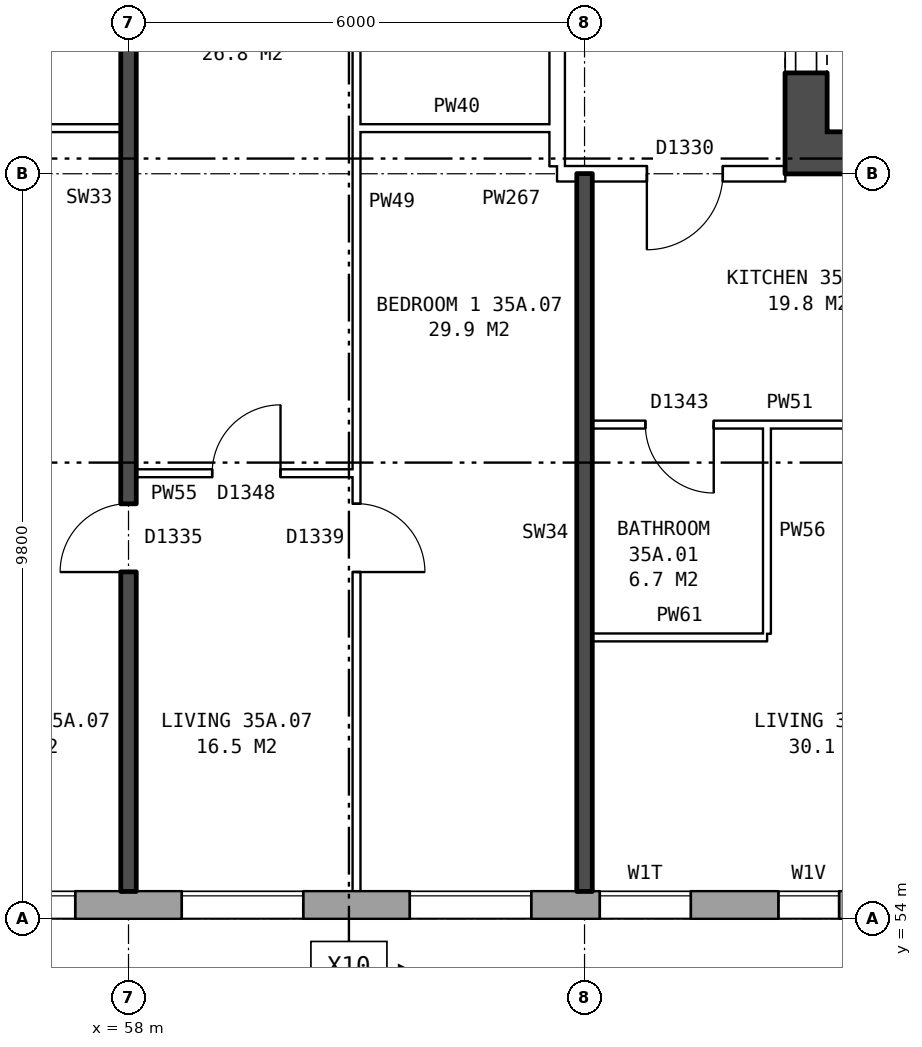
"""IFC4 building model, lengths in metres.
Left out: names, types, materials, properties, quantities, classifications, styles, units other than length and angle.
Written with IfcOpenShell. Run it as: python <this file> out.ifc"""

import sys

from ifc_helpers import new_model, si_unit, direction, frame, frame_2d, origin, place, context, subcontext, project, spatial, rectangle, extrude, element, fill, save


model = new_model("IFC4")
c1 = context("Model", 3, precision=1e-05, world=origin(), true_north=direction((0.0, 1.0)))
c2 = subcontext(c1, "Body", "Model", "MODEL_VIEW")
j1 = project(units=[si_unit("LENGTHUNIT", "METRE"), si_unit("PLANEANGLEUNIT", "RADIAN")], contexts=[c1])
p1 = place(None, origin())
s1 = spatial("IfcSite", under=j1, at=p1, CompositionType="ELEMENT")
p2 = place(p1, origin())
s2 = spatial("IfcBuilding", under=s1, at=p2, CompositionType="ELEMENT")
p3 = place(p2, frame((0.0, 0.0, 126.8)))
s3 = spatial("IfcBuildingStorey", under=s2, at=p3, CompositionType="ELEMENT", Elevation=126.8)
p4 = place(p3, frame((29.825, 54.18, 0.0), z_axis=(0.0, 0.0, 1.0), x_axis=(1.0, 0.0, 0.0)))
e1 = element("IfcWall", 1, at=p4, inside=s3, PredefinedType="STANDARD", context=c2, shape_type="SweptSolid", body=[
    extrude(rectangle(XDim=43.101, YDim=0.36, at=frame_2d((21.55, 0.0))), origin(), (0.0, 0.0, 1.0), 2.85),
])
p5 = place(p4, frame((1.875, 0.0, 0.8)))
e2 = element("IfcOpeningElement", 2, at=p5, cuts=e1, PredefinedType="OPENING", context=c2, shape_type="SweptSolid", body=[
    extrude(rectangle(XDim=1.6, YDim=1.8, at=frame_2d((0.8, 0.9))), frame((0.0, 0.19, 0.0), z_axis=(0.0, -1.0, 0.0), x_axis=(1.0, 0.0, 0.0)), (0.0, 0.0, 1.0), 0.38),
])
p6 = place(p4, frame((4.375, 0.0, 0.8)))
e3 = element("IfcOpeningElement", 3, at=p6, cuts=e1, PredefinedType="OPENING", context=c2, shape_type="SweptSolid", body=[
    extrude(rectangle(XDim=1.0, YDim=1.8, at=frame_2d((0.5, 0.9))), frame((0.0, 0.19, 0.0), z_axis=(0.0, -1.0, 0.0), x_axis=(1.0, 0.0, 0.0)), (0.0, 0.0, 1.0), 0.38),
])
p7 = place(p4, frame((5.675, 0.0, 1.6)))
e4 = element("IfcOpeningElement", 4, at=p7, cuts=e1, PredefinedType="OPENING", context=c2, shape_type="SweptSolid", body=[
    extrude(rectangle(XDim=0.6, YDim=0.9, at=frame_2d((0.3, 0.45))), frame((0.0, 0.19, 0.0), z_axis=(0.0, -1.0, 0.0), x_axis=(1.0, 0.0, 0.0)), (0.0, 0.0, 1.0), 0.38),
])
p8 = place(p4, frame((10.875, 0.0, 0.8)))
e5 = element("IfcOpeningElement", 5, at=p8, cuts=e1, PredefinedType="OPENING", context=c2, shape_type="SweptSolid", body=[
    extrude(rectangle(XDim=1.6, YDim=1.8, at=frame_2d((0.8, 0.9))), frame((0.0, 0.19, 0.0), z_axis=(0.0, -1.0, 0.0), x_axis=(1.0, 0.0, 0.0)), (0.0, 0.0, 1.0), 0.38),
])
p9 = place(p4, frame((13.875, 0.0, 0.8)))
e6 = element("IfcOpeningElement", 6, at=p9, cuts=e1, PredefinedType="OPENING", context=c2, shape_type="SweptSolid", body=[
    extrude(rectangle(XDim=1.6, YDim=1.8, at=frame_2d((0.8, 0.9))), frame((0.0, 0.19, 0.0), z_axis=(0.0, -1.0, 0.0), x_axis=(1.0, 0.0, 0.0)), (0.0, 0.0, 1.0), 0.38),
])
p10 = place(p4, frame((16.875, 0.0, 0.8)))
e7 = element("IfcOpeningElement", 7, at=p10, cuts=e1, PredefinedType="OPENING", context=c2, shape_type="SweptSolid", body=[
    extrude(rectangle(XDim=1.6, YDim=1.8, at=frame_2d((0.8, 0.9))), frame((0.0, 0.19, 0.0), z_axis=(0.0, -1.0, 0.0), x_axis=(1.0, 0.0, 0.0)), (0.0, 0.0, 1.0), 0.38),
])
p11 = place(p4, frame((19.875, 0.0, 0.8)))
e8 = element("IfcOpeningElement", 8, at=p11, cuts=e1, PredefinedType="OPENING", context=c2, shape_type="SweptSolid", body=[
    extrude(rectangle(XDim=1.6, YDim=1.8, at=frame_2d((0.8, 0.9))), frame((0.0, 0.19, 0.0), z_axis=(0.0, -1.0, 0.0), x_axis=(1.0, 0.0, 0.0)), (0.0, 0.0, 1.0), 0.38),
])
p12 = place(p4, frame((22.875, 0.0, 0.8)))
e9 = element("IfcOpeningElement", 9, at=p12, cuts=e1, PredefinedType="OPENING", context=c2, shape_type="SweptSolid", body=[
    extrude(rectangle(XDim=1.6, YDim=1.8, at=frame_2d((0.8, 0.9))), frame((0.0, 0.19, 0.0), z_axis=(0.0, -1.0, 0.0), x_axis=(1.0, 0.0, 0.0)), (0.0, 0.0, 1.0), 0.38),
])
p13 = place(p4, frame((25.875, 0.0, 0.8)))
e10 = element("IfcOpeningElement", 10, at=p13, cuts=e1, PredefinedType="OPENING", context=c2, shape_type="SweptSolid", body=[
    extrude(rectangle(XDim=1.6, YDim=1.8, at=frame_2d((0.8, 0.9))), frame((0.0, 0.19, 0.0), z_axis=(0.0, -1.0, 0.0), x_axis=(1.0, 0.0, 0.0)), (0.0, 0.0, 1.0), 0.38),
])
p14 = place(p4, frame((28.875, 0.0, 0.8)))
e11 = element("IfcOpeningElement", 11, at=p14, cuts=e1, PredefinedType="OPENING", context=c2, shape_type="SweptSolid", body=[
    extrude(rectangle(XDim=1.6, YDim=1.8, at=frame_2d((0.8, 0.9))), frame((0.0, 0.19, 0.0), z_axis=(0.0, -1.0, 0.0), x_axis=(1.0, 0.0, 0.0)), (0.0, 0.0, 1.0), 0.38),
])
p15 = place(p4, frame((31.875, 0.0, 0.8)))
e12 = element("IfcOpeningElement", 12, at=p15, cuts=e1, PredefinedType="OPENING", context=c2, shape_type="SweptSolid", body=[
    extrude(rectangle(XDim=1.6, YDim=1.8, at=frame_2d((0.8, 0.9))), frame((0.0, 0.19, 0.0), z_axis=(0.0, -1.0, 0.0), x_axis=(1.0, 0.0, 0.0)), (0.0, 0.0, 1.0), 0.38),
])
p16 = place(p4, frame((34.375, 0.0, 0.8)))
e13 = element("IfcOpeningElement", 13, at=p16, cuts=e1, PredefinedType="OPENING", context=c2, shape_type="SweptSolid", body=[
    extrude(rectangle(XDim=1.2, YDim=0.9, at=frame_2d((0.6, 0.45))), frame((0.0, 0.19, 0.0), z_axis=(0.0, -1.0, 0.0), x_axis=(1.0, 0.0, 0.0)), (0.0, 0.0, 1.0), 0.38),
])
p17 = place(p4, frame((37.875, 0.0, 0.8)))
e14 = element("IfcOpeningElement", 14, at=p17, cuts=e1, PredefinedType="OPENING", context=c2, shape_type="SweptSolid", body=[
    extrude(rectangle(XDim=1.6, YDim=1.8, at=frame_2d((0.8, 0.9))), frame((0.0, 0.19, 0.0), z_axis=(0.0, -1.0, 0.0), x_axis=(1.0, 0.0, 0.0)), (0.0, 0.0, 1.0), 0.38),
])
p18 = place(p4, frame((40.875, 0.0, 0.8)))
e15 = element("IfcOpeningElement", 15, at=p18, cuts=e1, PredefinedType="OPENING", context=c2, shape_type="SweptSolid", body=[
    extrude(rectangle(XDim=1.6, YDim=1.8, at=frame_2d((0.8, 0.9))), frame((0.0, 0.19, 0.0), z_axis=(0.0, -1.0, 0.0), x_axis=(1.0, 0.0, 0.0)), (0.0, 0.0, 1.0), 0.38),
])
p19 = place(p4, frame((7.525, 0.0, 0.8)))
e16 = element("IfcOpeningElement", 16, at=p19, cuts=e1, PredefinedType="OPENING", context=c2, shape_type="SweptSolid", body=[
    extrude(rectangle(XDim=0.6, YDim=0.9, at=frame_2d((0.3, 0.45))), frame((0.0, 0.19, 0.0), z_axis=(0.0, -1.0, 0.0), x_axis=(1.0, 0.0, 0.0)), (0.0, 0.0, 1.0), 0.38),
])
p20 = place(p4, frame((8.525, 0.0, 0.8)))
e17 = element("IfcOpeningElement", 17, at=p20, cuts=e1, PredefinedType="OPENING", context=c2, shape_type="SweptSolid", body=[
    extrude(rectangle(XDim=1.4, YDim=1.8, at=frame_2d((0.7, 0.9))), frame((0.0, 0.19, 0.0), z_axis=(0.0, -1.0, 0.0), x_axis=(1.0, 0.0, 0.0)), (0.0, 0.0, 1.0), 0.38),
])
p21 = place(p4, frame((36.725, 0.0, 1.7)))
e18 = element("IfcOpeningElement", 18, at=p21, cuts=e1, PredefinedType="OPENING", context=c2, shape_type="SweptSolid", body=[
    extrude(rectangle(XDim=0.8, YDim=0.9, at=frame_2d((0.4, 0.45))), frame((0.0, 0.19, 0.0), z_axis=(0.0, -1.0, 0.0), x_axis=(1.0, 0.0, 0.0)), (0.0, 0.0, 1.0), 0.38),
])
p22 = place(p3, frame((66.915, 63.8, 0.0), z_axis=(0.0, 0.0, 1.0), x_axis=(0.0, 1.0, 0.0)))
e19 = element("IfcWall", 19, at=p22, inside=s3, PredefinedType="SHEAR", context=c2, shape_type="SweptSolid", body=[
    extrude(rectangle(XDim=12.4, YDim=0.55, at=frame_2d((6.2, 0.0))), origin(), (0.0, 0.0, 1.0), 2.85),
])
p23 = place(p22, frame((1.325, 0.0, 0.0)))
e20 = element("IfcOpeningElement", 20, at=p23, cuts=e19, PredefinedType="OPENING", context=c2, shape_type="SweptSolid", body=[
    extrude(rectangle(XDim=1.1, YDim=2.1, at=frame_2d((0.55, 1.05))), frame((0.0, 0.285, 0.0), z_axis=(0.0, -1.0, 0.0), x_axis=(1.0, 0.0, 0.0)), (0.0, 0.0, 1.0), 0.57),
])
p24 = place(p22, frame((3.6, 0.0, 0.0)))
e21 = element("IfcOpeningElement", 21, at=p24, cuts=e19, PredefinedType="OPENING", context=c2, shape_type="SweptSolid", body=[
    extrude(rectangle(XDim=1.1, YDim=2.1, at=frame_2d((0.55, 1.05))), frame((0.0, 0.285, 0.0), z_axis=(0.0, -1.0, 0.0), x_axis=(1.0, 0.0, 0.0)), (0.0, 0.0, 1.0), 0.57),
])
p25 = place(p22, frame((5.8, 0.0, 0.0)))
e22 = element("IfcOpeningElement", 22, at=p25, cuts=e19, PredefinedType="OPENING", context=c2, shape_type="SweptSolid", body=[
    extrude(rectangle(XDim=1.1, YDim=2.1, at=frame_2d((0.55, 1.05))), frame((0.0, 0.285, 0.0), z_axis=(0.0, -1.0, 0.0), x_axis=(1.0, 0.0, 0.0)), (0.0, 0.0, 1.0), 0.57),
])
p26 = place(p22, frame((8.0, 0.0, 0.0)))
e23 = element("IfcOpeningElement", 23, at=p26, cuts=e19, PredefinedType="OPENING", context=c2, shape_type="SweptSolid", body=[
    extrude(rectangle(XDim=1.1, YDim=2.1, at=frame_2d((0.55, 1.05))), frame((0.0, 0.285, 0.0), z_axis=(0.0, -1.0, 0.0), x_axis=(1.0, 0.0, 0.0)), (0.0, 0.0, 1.0), 0.57),
])
p27 = place(p22, frame((9.9, 0.0, 0.0)))
e24 = element("IfcOpeningElement", 24, at=p27, cuts=e19, PredefinedType="OPENING", context=c2, shape_type="SweptSolid", body=[
    extrude(rectangle(XDim=1.1, YDim=2.1, at=frame_2d((0.55, 1.05))), frame((0.0, 0.285, 0.0), z_axis=(0.0, -1.0, 0.0), x_axis=(1.0, 0.0, 0.0)), (0.0, 0.0, 1.0), 0.57),
])
p28 = place(p3, frame((67.19, 64.075, 0.0), z_axis=(0.0, 0.0, 1.0), x_axis=(1.0, 0.0, 0.0)))
e25 = element("IfcWall", 25, at=p28, inside=s3, PredefinedType="SHEAR", context=c2, shape_type="SweptSolid", body=[
    extrude(rectangle(XDim=7.9, YDim=0.55, at=frame_2d((3.95, 0.0))), origin(), (0.0, 0.0, 1.0), 2.85),
])
p29 = place(p3, frame((63.64, 63.9, 0.0), z_axis=(0.0, 0.0, 1.0), x_axis=(0.0, 1.0, 0.0)))
e26 = element("IfcWall", 26, at=p29, inside=s3, PredefinedType="PARTITIONING", context=c2, shape_type="SweptSolid", body=[
    extrude(rectangle(XDim=12.2, YDim=0.2, at=frame_2d((6.1, 0.0))), origin(), (0.0, 0.0, 1.0), 2.85),
])
p30 = place(p29, frame((5.1, 0.0, 0.0)))
e27 = element("IfcOpeningElement", 27, at=p30, cuts=e26, PredefinedType="OPENING", context=c2, shape_type="SweptSolid", body=[
    extrude(rectangle(XDim=2.0, YDim=2.1, at=frame_2d((1.0, 1.05))), frame((0.0, 0.11, 0.0), z_axis=(0.0, -1.0, 0.0), x_axis=(1.0, 0.0, 0.0)), (0.0, 0.0, 1.0), 0.22),
])
p31 = place(p3, frame((64.1, 57.7, 0.0), z_axis=(0.0, 0.0, 1.0), x_axis=(1.0, 0.0, 0.0)))
e28 = element("IfcWall", 28, at=p31, inside=s3, PredefinedType="PARTITIONING", context=c2, shape_type="SweptSolid", body=[
    extrude(rectangle(XDim=2.3, YDim=0.1, at=frame_2d((1.15, 0.0))), origin(), (0.0, 0.0, 1.0), 2.85),
])
p32 = place(p3, frame((58.1, 59.86, 0.0), z_axis=(0.0, 0.0, 1.0), x_axis=(1.0, 0.0, 0.0)))
e29 = element("IfcWall", 29, at=p32, inside=s3, PredefinedType="PARTITIONING", context=c2, shape_type="SweptSolid", body=[
    extrude(rectangle(XDim=2.9, YDim=0.1, at=frame_2d((1.45, 0.0))), origin(), (0.0, 0.0, 1.0), 2.85),
])
p33 = place(p32, frame((1.0, 0.0, 0.0)))
e30 = element("IfcOpeningElement", 30, at=p33, cuts=e29, PredefinedType="OPENING", context=c2, shape_type="SweptSolid", body=[
    extrude(rectangle(XDim=0.9, YDim=2.1, at=frame_2d((0.45, 1.05))), frame((0.0, 0.06, 0.0), z_axis=(0.0, -1.0, 0.0), x_axis=(1.0, 0.0, 0.0)), (0.0, 0.0, 1.0), 0.12),
])
p34 = place(p3, frame((64.1, 60.5, 0.0), z_axis=(0.0, 0.0, 1.0), x_axis=(1.0, 0.0, 0.0)))
e31 = element("IfcWall", 31, at=p34, inside=s3, PredefinedType="PARTITIONING", context=c2, shape_type="SweptSolid", body=[
    extrude(rectangle(XDim=5.8, YDim=0.1, at=frame_2d((2.9, 0.0))), origin(), (0.0, 0.0, 1.0), 2.85),
])
p35 = place(p34, frame((3.6, 0.0, 0.0)))
e32 = element("IfcOpeningElement", 32, at=p35, cuts=e31, PredefinedType="OPENING", context=c2, shape_type="SweptSolid", body=[
    extrude(rectangle(XDim=0.9, YDim=2.1, at=frame_2d((0.45, 1.05))), frame((0.0, 0.06, 0.0), z_axis=(0.0, -1.0, 0.0), x_axis=(1.0, 0.0, 0.0)), (0.0, 0.0, 1.0), 0.12),
])
p36 = place(p34, frame((0.7, 0.0, 0.0)))
e33 = element("IfcOpeningElement", 33, at=p36, cuts=e31, PredefinedType="OPENING", context=c2, shape_type="SweptSolid", body=[
    extrude(rectangle(XDim=0.9, YDim=2.1, at=frame_2d((0.45, 1.05))), frame((0.0, 0.06, 0.0), z_axis=(0.0, -1.0, 0.0), x_axis=(1.0, 0.0, 0.0)), (0.0, 0.0, 1.0), 0.12),
])
p37 = place(p3, frame((63.64, 63.8, 0.0), z_axis=(0.0, 0.0, 1.0), x_axis=(1.0, 0.0, 0.0)))
e34 = element("IfcWall", 34, at=p37, inside=s3, PredefinedType="PARTITIONING", context=c2, shape_type="SweptSolid", body=[
    extrude(rectangle(XDim=3.0, YDim=0.2, at=frame_2d((1.5, 0.0))), origin(), (0.0, 0.0, 1.0), 2.85),
])
p38 = place(p37, frame((1.18, 0.0, 0.0)))
e35 = element("IfcOpeningElement", 35, at=p38, cuts=e34, PredefinedType="OPENING", context=c2, shape_type="SweptSolid", body=[
    extrude(rectangle(XDim=1.0, YDim=2.1, at=frame_2d((0.5, 1.05))), frame((0.0, 0.11, 0.0), z_axis=(0.0, -1.0, 0.0), x_axis=(1.0, 0.0, 0.0)), (0.0, 0.0, 1.0), 0.22),
])
p39 = place(p3, frame((55.1, 64.4, 0.0), z_axis=(0.0, 0.0, 1.0), x_axis=(1.0, 0.0, 0.0)))
e36 = element("IfcWall", 36, at=p39, inside=s3, PredefinedType="PARTITIONING", context=c2, shape_type="SweptSolid", body=[
    extrude(rectangle(XDim=2.8, YDim=0.1, at=frame_2d((1.4, 0.0))), origin(), (0.0, 0.0, 1.0), 2.85),
])
p40 = place(p3, frame((61.0, 64.4, 0.0), z_axis=(0.0, 0.0, 1.0), x_axis=(1.0, 0.0, 0.0)))
e37 = element("IfcWall", 37, at=p40, inside=s3, PredefinedType="PARTITIONING", context=c2, shape_type="SweptSolid", body=[
    extrude(rectangle(XDim=2.64, YDim=0.1, at=frame_2d((1.32, 0.0))), origin(), (0.0, 0.0, 1.0), 2.85),
])
p41 = place(p3, frame((58.0, 54.36, 0.0), z_axis=(0.0, 0.0, 1.0), x_axis=(0.0, 1.0, 0.0)))
e38 = element("IfcWall", 38, at=p41, inside=s3, PredefinedType="SOLIDWALL", context=c2, shape_type="SweptSolid", body=[
    extrude(rectangle(XDim=14.44, YDim=0.2, at=frame_2d((7.22, 0.0))), origin(), (0.0, 0.0, 1.0), 2.85),
])
p42 = place(p41, frame((4.2, 0.0, 0.0)))
e39 = element("IfcOpeningElement", 39, at=p42, cuts=e38, PredefinedType="OPENING", context=c2, shape_type="SweptSolid", body=[
    extrude(rectangle(XDim=0.9, YDim=2.1, at=frame_2d((0.45, 1.05))), frame((0.0, 0.11, 0.0), z_axis=(0.0, -1.0, 0.0), x_axis=(1.0, 0.0, 0.0)), (0.0, 0.0, 1.0), 0.22),
])
p43 = place(p41, frame((13.14, 0.0, 0.0)))
e40 = element("IfcOpeningElement", 40, at=p43, cuts=e38, PredefinedType="OPENING", context=c2, shape_type="SweptSolid", body=[
    extrude(rectangle(XDim=0.9, YDim=2.1, at=frame_2d((0.45, 1.05))), frame((0.0, 0.11, 0.0), z_axis=(0.0, -1.0, 0.0), x_axis=(1.0, 0.0, 0.0)), (0.0, 0.0, 1.0), 0.22),
])
p44 = place(p3, frame((61.0, 54.36, 0.0), z_axis=(0.0, 0.0, 1.0), x_axis=(0.0, 1.0, 0.0)))
e41 = element("IfcWall", 41, at=p44, inside=s3, PredefinedType="PARTITIONING", context=c2, shape_type="SweptSolid", body=[
    extrude(rectangle(XDim=14.34, YDim=0.1, at=frame_2d((7.17, 0.0))), origin(), (0.0, 0.0, 1.0), 2.85),
])
p45 = place(p44, frame((4.2, 0.0, 0.0)))
e42 = element("IfcOpeningElement", 42, at=p45, cuts=e41, PredefinedType="OPENING", context=c2, shape_type="SweptSolid", body=[
    extrude(rectangle(XDim=0.9, YDim=2.1, at=frame_2d((0.45, 1.05))), frame((0.0, 0.06, 0.0), z_axis=(0.0, -1.0, 0.0), x_axis=(1.0, 0.0, 0.0)), (0.0, 0.0, 1.0), 0.12),
])
p46 = place(p44, frame((13.04, 0.0, 0.0)))
e43 = element("IfcOpeningElement", 43, at=p46, cuts=e41, PredefinedType="OPENING", context=c2, shape_type="SweptSolid", body=[
    extrude(rectangle(XDim=0.9, YDim=2.1, at=frame_2d((0.45, 1.05))), frame((0.0, 0.06, 0.0), z_axis=(0.0, -1.0, 0.0), x_axis=(1.0, 0.0, 0.0)), (0.0, 0.0, 1.0), 0.12),
])
p47 = place(p3, frame((64.0, 54.36, 0.0), z_axis=(0.0, 0.0, 1.0), x_axis=(0.0, 1.0, 0.0)))
e44 = element("IfcWall", 44, at=p47, inside=s3, PredefinedType="SOLIDWALL", context=c2, shape_type="SweptSolid", body=[
    extrude(rectangle(XDim=9.44, YDim=0.2, at=frame_2d((4.72, 0.0))), origin(), (0.0, 0.0, 1.0), 2.85),
])
p48 = place(p3, frame((66.4, 57.75, 0.0), z_axis=(0.0, 0.0, 1.0), x_axis=(0.0, 1.0, 0.0)))
e45 = element("IfcWall", 45, at=p48, inside=s3, PredefinedType="PARTITIONING", context=c2, shape_type="SweptSolid", body=[
    extrude(rectangle(XDim=2.7, YDim=0.1, at=frame_2d((1.35, 0.0))), origin(), (0.0, 0.0, 1.0), 2.85),
])
p49 = place(p13, origin())
e46 = element("IfcWindow", 46, at=p49, inside=s3, PartitioningType="SINGLE_PANEL", PredefinedType="WINDOW", context=c2, shape_type="SweptSolid", body=[
    extrude(rectangle(XDim=1.6, YDim=1.8, at=frame_2d((0.8, 0.9))), frame((0.0, 0.15, 0.0), z_axis=(0.0, -1.0, 0.0), x_axis=(1.0, 0.0, 0.0)), (0.0, 0.0, 1.0), 0.06),
])
fill(e10, e46)
p50 = place(p14, origin())
e47 = element("IfcWindow", 47, at=p50, inside=s3, PartitioningType="SINGLE_PANEL", PredefinedType="WINDOW", context=c2, shape_type="SweptSolid", body=[
    extrude(rectangle(XDim=1.6, YDim=1.8, at=frame_2d((0.8, 0.9))), frame((0.0, 0.15, 0.0), z_axis=(0.0, -1.0, 0.0), x_axis=(1.0, 0.0, 0.0)), (0.0, 0.0, 1.0), 0.06),
])
fill(e11, e47)
p51 = place(p15, origin())
e48 = element("IfcWindow", 48, at=p51, inside=s3, PartitioningType="SINGLE_PANEL", PredefinedType="WINDOW", context=c2, shape_type="SweptSolid", body=[
    extrude(rectangle(XDim=1.6, YDim=1.8, at=frame_2d((0.8, 0.9))), frame((0.0, 0.15, 0.0), z_axis=(0.0, -1.0, 0.0), x_axis=(1.0, 0.0, 0.0)), (0.0, 0.0, 1.0), 0.06),
])
fill(e12, e48)
p52 = place(p16, origin())
e49 = element("IfcWindow", 49, at=p52, inside=s3, PartitioningType="SINGLE_PANEL", PredefinedType="WINDOW", context=c2, shape_type="SweptSolid", body=[
    extrude(rectangle(XDim=1.2, YDim=0.9, at=frame_2d((0.6, 0.45))), frame((0.0, 0.15, 0.0), z_axis=(0.0, -1.0, 0.0), x_axis=(1.0, 0.0, 0.0)), (0.0, 0.0, 1.0), 0.06),
])
fill(e13, e49)
p53 = place(p23, origin())
e50 = element("IfcDoor", 50, at=p53, inside=s3, OperationType="DOUBLE_DOOR_SLIDING", PredefinedType="DOOR", context=c2, shape_type="SweptSolid", body=[
    extrude(rectangle(XDim=1.1, YDim=2.1, at=frame_2d((0.55, 1.05))), frame((0.0, -0.21, 0.0), z_axis=(0.0, -1.0, 0.0), x_axis=(1.0, 0.0, 0.0)), (0.0, 0.0, 1.0), 0.05),
])
fill(e20, e50)
p54 = place(p38, frame((1.0, 0.0, 0.0), z_axis=(0.0, 0.0, 1.0), x_axis=(-1.0, 0.0, 0.0)))
e51 = element("IfcDoor", 51, at=p54, inside=s3, OperationType="SINGLE_SWING_RIGHT", PredefinedType="DOOR", context=c2, shape_type="SweptSolid", body=[
    extrude(rectangle(XDim=1.0, YDim=2.1, at=frame_2d((0.5, 1.05))), frame((0.0, 0.025, 0.0), z_axis=(0.0, -1.0, 0.0), x_axis=(1.0, 0.0, 0.0)), (0.0, 0.0, 1.0), 0.05),
])
fill(e35, e51)
p55 = place(p36, frame((0.9, 0.0, 0.0), z_axis=(0.0, 0.0, 1.0), x_axis=(-1.0, 0.0, 0.0)))
e52 = element("IfcDoor", 52, at=p55, inside=s3, OperationType="SINGLE_SWING_LEFT", PredefinedType="DOOR", context=c2, shape_type="SweptSolid", body=[
    extrude(rectangle(XDim=0.9, YDim=2.1, at=frame_2d((0.45, 1.05))), frame((0.0, 0.025, 0.0), z_axis=(0.0, -1.0, 0.0), x_axis=(1.0, 0.0, 0.0)), (0.0, 0.0, 1.0), 0.05),
])
fill(e33, e52)
p56 = place(p45, frame((0.9, 0.0, 0.0), z_axis=(0.0, 0.0, 1.0), x_axis=(-1.0, 0.0, 0.0)))
e53 = element("IfcDoor", 53, at=p56, inside=s3, OperationType="SINGLE_SWING_RIGHT", PredefinedType="DOOR", context=c2, shape_type="SweptSolid", body=[
    extrude(rectangle(XDim=0.9, YDim=2.1, at=frame_2d((0.45, 1.05))), frame((0.0, 0.025, 0.0), z_axis=(0.0, -1.0, 0.0), x_axis=(1.0, 0.0, 0.0)), (0.0, 0.0, 1.0), 0.05),
])
fill(e42, e53)
p57 = place(p42, origin())
e54 = element("IfcDoor", 54, at=p57, inside=s3, OperationType="SINGLE_SWING_LEFT", PredefinedType="DOOR", context=c2, shape_type="SweptSolid", body=[
    extrude(rectangle(XDim=0.9, YDim=2.1, at=frame_2d((0.45, 1.05))), frame((0.0, 0.025, 0.0), z_axis=(0.0, -1.0, 0.0), x_axis=(1.0, 0.0, 0.0)), (0.0, 0.0, 1.0), 0.05),
])
fill(e39, e54)
p58 = place(p33, origin())
e55 = element("IfcDoor", 55, at=p58, inside=s3, OperationType="SINGLE_SWING_RIGHT", PredefinedType="DOOR", context=c2, shape_type="SweptSolid", body=[
    extrude(rectangle(XDim=0.9, YDim=2.1, at=frame_2d((0.45, 1.05))), frame((0.0, 0.025, 0.0), z_axis=(0.0, -1.0, 0.0), x_axis=(1.0, 0.0, 0.0)), (0.0, 0.0, 1.0), 0.05),
])
fill(e30, e55)
p59 = place(p21, origin())
e56 = element("IfcWindow", 56, at=p59, inside=s3, PartitioningType="SINGLE_PANEL", PredefinedType="WINDOW", context=c2, shape_type="SweptSolid", body=[
    extrude(rectangle(XDim=0.8, YDim=0.9, at=frame_2d((0.4, 0.45))), frame((0.0, 0.15, 0.0), z_axis=(0.0, -1.0, 0.0), x_axis=(1.0, 0.0, 0.0)), (0.0, 0.0, 1.0), 0.06),
])
fill(e18, e56)
save(model, sys.argv[1])
